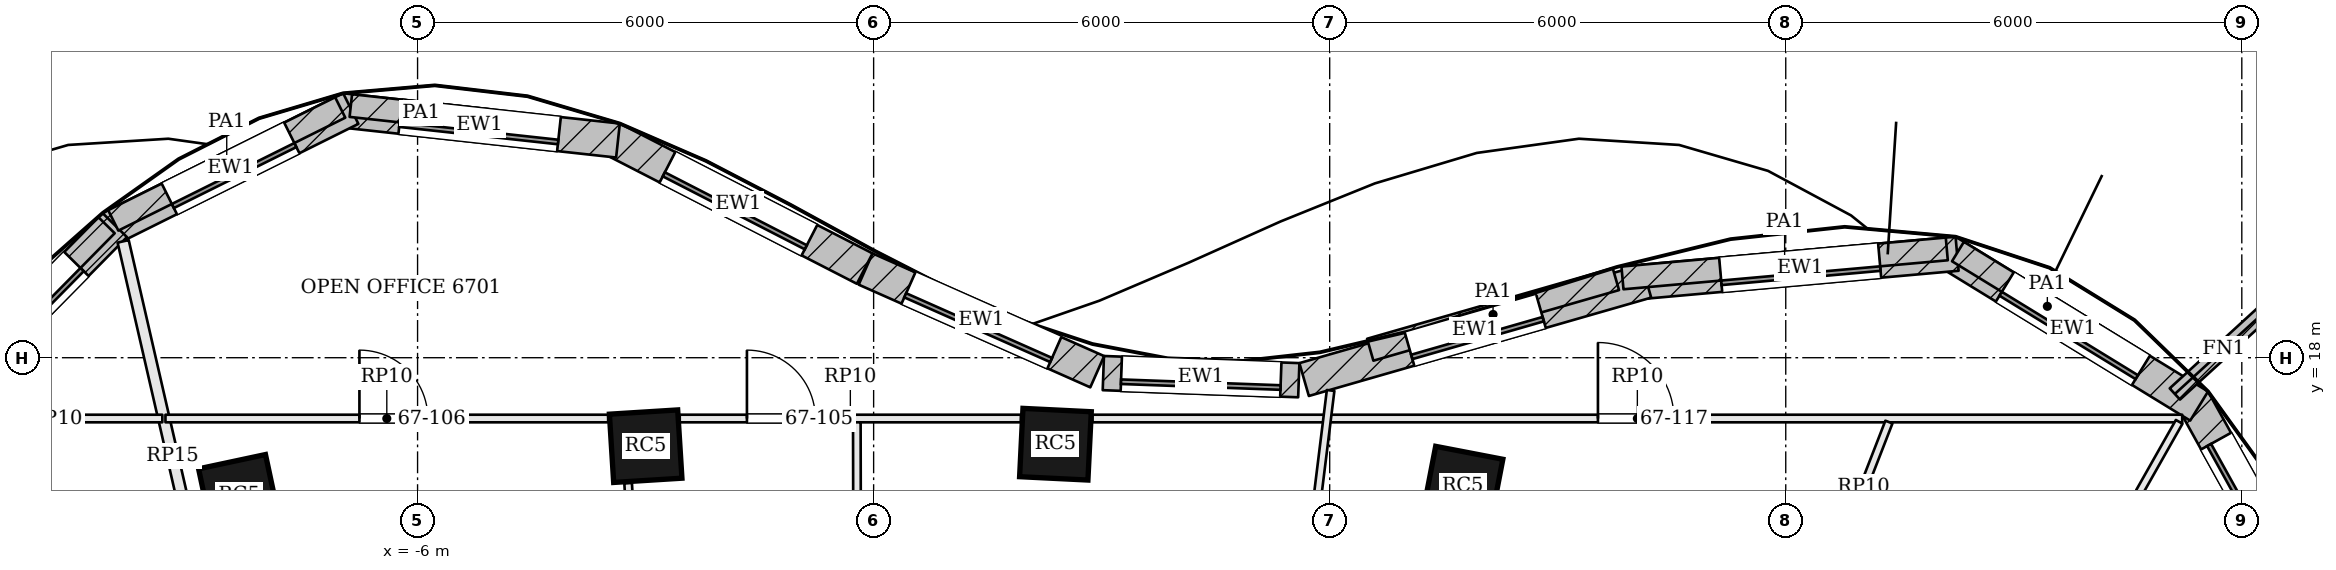
"""IFC4 building model, lengths in metres.
Left out: names, types, materials, properties, quantities, classifications, styles, units other than length and angle.
Written with IfcOpenShell. Run it as: python <this file> out.ifc"""

import sys

from ifc_helpers import new_model, si_unit, direction, frame, frame_2d, origin, origin_2d, place, context, subcontext, project, spatial, rectangle, extrude, element, fill, save


model = new_model("IFC4")
c1 = context("Model", 3, precision=1e-05, world=origin(), true_north=direction((0.0, 1.0)))
c2 = subcontext(c1, "Body", "Model", "MODEL_VIEW")
j1 = project(units=[si_unit("LENGTHUNIT", "METRE"), si_unit("PLANEANGLEUNIT", "RADIAN")], contexts=[c1])
p1 = place(None, origin())
s1 = spatial("IfcSite", under=j1, at=p1, CompositionType="ELEMENT")
p2 = place(p1, origin())
s2 = spatial("IfcBuilding", under=s1, at=p2, CompositionType="ELEMENT")
p3 = place(p2, frame((0.0, 0.0, 272.7)))
s3 = spatial("IfcBuildingStorey", under=s2, at=p3, CompositionType="ELEMENT", Elevation=272.7)
for number, where, z_axis, x_axis in (
    (1, (7.751, 16.307, 0.0), (0.0, 0.0, 1.0), (-0.982, 0.189, 0.0)),
    (2, (2.392, 16.862, 0.0), (0.0, 0.0, 1.0), (-0.999, 0.049, 0.0)),
    (3, (-2.999, 16.836, 0.0), (0.0, 0.0, 1.0), (-0.998, -0.062, 0.0)),
    (4, (-8.347, 16.192, 0.0), (0.0, 0.0, 1.0), (-0.978, -0.209, 0.0)),
):
    element("IfcColumn", number, at=place(p3, frame(where, z_axis=z_axis, x_axis=x_axis)), inside=s3, PredefinedType="COLUMN", context=c2, shape_type="SweptSolid", body=[
        extrude(rectangle(XDim=0.9, YDim=0.9, at=origin_2d()), origin(), (0.0, 0.0, 1.0), 3.9),
    ])
p4 = place(p3, frame((18.983, 14.523, 0.0), z_axis=(0.0, 0.0, 1.0), x_axis=(-0.485630534022, 0.874164163316, 0.0)))
e5 = element("IfcWall", 5, at=p4, inside=s3, PredefinedType="SOLIDWALL", context=c2, shape_type="SweptSolid", body=[
    extrude(rectangle(XDim=3.344, YDim=0.45, at=frame_2d((1.672, 0.0))), origin(), (0.0, 0.0, 1.0), 3.7),
])
p5 = place(p4, frame((0.622, 0.0, 0.9)))
e6 = element("IfcOpeningElement", 6, at=p5, cuts=e5, PredefinedType="OPENING", context=c2, shape_type="SweptSolid", body=[
    extrude(rectangle(XDim=2.1, YDim=2.3, at=frame_2d((1.05, 1.15))), frame((0.0, 0.235, 0.0), z_axis=(0.0, -1.0, 0.0), x_axis=(1.0, 0.0, 0.0)), (0.0, 0.0, 1.0), 0.47),
])
p6 = place(p3, frame((17.438, 17.364, 0.0), z_axis=(0.0, 0.0, 1.0), x_axis=(-0.852622865325, 0.522526793117, 0.0)))
e7 = element("IfcWall", 7, at=p6, inside=s3, PredefinedType="SOLIDWALL", context=c2, shape_type="SweptSolid", body=[
    extrude(rectangle(XDim=3.896, YDim=0.45, at=frame_2d((1.948, 0.0))), origin(), (0.0, 0.0, 1.0), 3.7),
])
p7 = place(p6, frame((0.898, 0.0, 0.9)))
e8 = element("IfcOpeningElement", 8, at=p7, cuts=e7, PredefinedType="OPENING", context=c2, shape_type="SweptSolid", body=[
    extrude(rectangle(XDim=2.1, YDim=2.3, at=frame_2d((1.05, 1.15))), frame((0.0, 0.235, 0.0), z_axis=(0.0, -1.0, 0.0), x_axis=(1.0, 0.0, 0.0)), (0.0, 0.0, 1.0), 0.47),
])
p8 = place(p3, frame((14.254, 19.368, 0.0), z_axis=(0.0, 0.0, 1.0), x_axis=(-0.996031553729, -0.089000808852, 0.0)))
e9 = element("IfcWall", 9, at=p8, inside=s3, PredefinedType="SOLIDWALL", context=c2, shape_type="SweptSolid", body=[
    extrude(rectangle(XDim=4.145, YDim=0.45, at=frame_2d((2.072, 0.0))), origin(), (0.0, 0.0, 1.0), 3.7),
])
p9 = place(p8, frame((1.022, 0.0, 0.9)))
e10 = element("IfcOpeningElement", 10, at=p9, cuts=e9, PredefinedType="OPENING", context=c2, shape_type="SweptSolid", body=[
    extrude(rectangle(XDim=2.1, YDim=2.3, at=frame_2d((1.05, 1.15))), frame((0.0, 0.235, 0.0), z_axis=(0.0, -1.0, 0.0), x_axis=(1.0, 0.0, 0.0)), (0.0, 0.0, 1.0), 0.47),
])
p10 = place(p3, frame((10.167, 19.007, 0.0), z_axis=(0.0, 0.0, 1.0), x_axis=(-0.961104057783, -0.276186513271, 0.0)))
e11 = element("IfcWall", 11, at=p10, inside=s3, PredefinedType="SOLIDWALL", context=c2, shape_type="SweptSolid", body=[
    extrude(rectangle(XDim=4.686, YDim=0.45, at=frame_2d((2.343, 0.0))), origin(), (0.0, 0.0, 1.0), 3.7),
])
p11 = place(p10, frame((1.443, 0.0, 0.9)))
e12 = element("IfcOpeningElement", 12, at=p11, cuts=e11, PredefinedType="OPENING", context=c2, shape_type="SweptSolid", body=[
    extrude(rectangle(XDim=1.8, YDim=2.3, at=frame_2d((0.9, 1.15))), frame((0.0, 0.235, 0.0), z_axis=(0.0, -1.0, 0.0), x_axis=(1.0, 0.0, 0.0)), (0.0, 0.0, 1.0), 0.47),
])
p12 = place(p3, frame((5.594, 17.704, 0.0), z_axis=(0.0, 0.0, 1.0), x_axis=(-0.999339560591, 0.036337895349, 0.0)))
e13 = element("IfcWall", 13, at=p12, inside=s3, PredefinedType="SOLIDWALL", context=c2, shape_type="SweptSolid", body=[
    extrude(rectangle(XDim=2.573, YDim=0.45, at=frame_2d((1.287, 0.0))), origin(), (0.0, 0.0, 1.0), 3.7),
])
p13 = place(p12, frame((0.237, 0.0, 0.9)))
e14 = element("IfcOpeningElement", 14, at=p13, cuts=e13, PredefinedType="OPENING", context=c2, shape_type="SweptSolid", body=[
    extrude(rectangle(XDim=2.1, YDim=2.3, at=frame_2d((1.05, 1.15))), frame((0.0, 0.235, 0.0), z_axis=(0.0, -1.0, 0.0), x_axis=(1.0, 0.0, 0.0)), (0.0, 0.0, 1.0), 0.47),
])
p14 = place(p3, frame((2.942, 17.816, 0.0), z_axis=(0.0, 0.0, 1.0), x_axis=(-0.91414046241, 0.405397601109, 0.0)))
e15 = element("IfcWall", 15, at=p14, inside=s3, PredefinedType="SOLIDWALL", context=c2, shape_type="SweptSolid", body=[
    extrude(rectangle(XDim=3.333, YDim=0.45, at=frame_2d((1.667, 0.0))), origin(), (0.0, 0.0, 1.0), 3.7),
])
p15 = place(p14, frame((0.617, 0.0, 0.9)))
e16 = element("IfcOpeningElement", 16, at=p15, cuts=e15, PredefinedType="OPENING", context=c2, shape_type="SweptSolid", body=[
    extrude(rectangle(XDim=2.1, YDim=2.3, at=frame_2d((1.05, 1.15))), frame((0.0, 0.235, 0.0), z_axis=(0.0, -1.0, 0.0), x_axis=(1.0, 0.0, 0.0)), (0.0, 0.0, 1.0), 0.47),
])
p16 = place(p3, frame((-0.117, 19.173, 0.0), z_axis=(0.0, 0.0, 1.0), x_axis=(-0.889471529144, 0.456990589446, 0.0)))
e17 = element("IfcWall", 17, at=p16, inside=s3, PredefinedType="SOLIDWALL", context=c2, shape_type="SweptSolid", body=[
    extrude(rectangle(XDim=3.735, YDim=0.45, at=frame_2d((1.868, 0.0))), origin(), (0.0, 0.0, 1.0), 3.7),
])
p17 = place(p16, frame((0.818, 0.0, 0.9)))
e18 = element("IfcOpeningElement", 18, at=p17, cuts=e17, PredefinedType="OPENING", context=c2, shape_type="SweptSolid", body=[
    extrude(rectangle(XDim=2.1, YDim=2.3, at=frame_2d((1.05, 1.15))), frame((0.0, 0.235, 0.0), z_axis=(0.0, -1.0, 0.0), x_axis=(1.0, 0.0, 0.0)), (0.0, 0.0, 1.0), 0.47),
])
p18 = place(p3, frame((-3.364, 20.857, 0.0), z_axis=(0.0, 0.0, 1.0), x_axis=(-0.99407653264, 0.108682322638, 0.0)))
e19 = element("IfcWall", 19, at=p18, inside=s3, PredefinedType="SOLIDWALL", context=c2, shape_type="SweptSolid", body=[
    extrude(rectangle(XDim=3.662, YDim=0.45, at=frame_2d((1.831, 0.0))), origin(), (0.0, 0.0, 1.0), 3.7),
])
p19 = place(p18, frame((0.781, 0.0, 0.9)))
e20 = element("IfcOpeningElement", 20, at=p19, cuts=e19, PredefinedType="OPENING", context=c2, shape_type="SweptSolid", body=[
    extrude(rectangle(XDim=2.1, YDim=2.3, at=frame_2d((1.05, 1.15))), frame((0.0, 0.235, 0.0), z_axis=(0.0, -1.0, 0.0), x_axis=(1.0, 0.0, 0.0)), (0.0, 0.0, 1.0), 0.47),
])
p20 = place(p3, frame((-6.879, 21.278, 0.0), z_axis=(0.0, 0.0, 1.0), x_axis=(-0.895268695224, -0.445526613517, 0.0)))
e21 = element("IfcWall", 21, at=p20, inside=s3, PredefinedType="SOLIDWALL", context=c2, shape_type="SweptSolid", body=[
    extrude(rectangle(XDim=3.533, YDim=0.45, at=frame_2d((1.767, 0.0))), origin(), (0.0, 0.0, 1.0), 3.7),
])
p21 = place(p20, frame((0.866, 0.0, 0.9)))
e22 = element("IfcOpeningElement", 22, at=p21, cuts=e21, PredefinedType="OPENING", context=c2, shape_type="SweptSolid", body=[
    extrude(rectangle(XDim=1.8, YDim=2.3, at=frame_2d((0.9, 1.15))), frame((0.0, 0.235, 0.0), z_axis=(0.0, -1.0, 0.0), x_axis=(1.0, 0.0, 0.0)), (0.0, 0.0, 1.0), 0.47),
])
p22 = place(p3, frame((-9.984, 19.745, 0.0), z_axis=(0.0, 0.0, 1.0), x_axis=(-0.701875966769, -0.712299183821, 0.0)))
e23 = element("IfcWall", 23, at=p22, inside=s3, PredefinedType="SOLIDWALL", context=c2, shape_type="SweptSolid", body=[
    extrude(rectangle(XDim=3.537, YDim=0.45, at=frame_2d((1.769, 0.0))), origin(), (0.0, 0.0, 1.0), 3.7),
])
p23 = place(p22, frame((0.718, 0.0, 0.9)))
e24 = element("IfcOpeningElement", 24, at=p23, cuts=e23, PredefinedType="OPENING", context=c2, shape_type="SweptSolid", body=[
    extrude(rectangle(XDim=2.1, YDim=2.3, at=frame_2d((1.05, 1.15))), frame((0.0, 0.235, 0.0), z_axis=(0.0, -1.0, 0.0), x_axis=(1.0, 0.0, 0.0)), (0.0, 0.0, 1.0), 0.47),
])
p24 = place(p3, frame((17.119, 17.523, 0.0), z_axis=(0.0, 0.0, 1.0), x_axis=(0.737866019047, 0.674947211221, 0.0)))
e25 = element("IfcWall", 25, at=p24, inside=s3, PredefinedType="SOLIDWALL", context=c2, shape_type="SweptSolid", body=[
    extrude(rectangle(XDim=1.75, YDim=0.2, at=frame_2d((0.875, 0.0))), origin(), (0.0, 0.0, 1.0), 3.7),
])
p25 = place(p3, frame((16.617, 17.955, 3.9), z_axis=(0.0, 0.0, 1.0), x_axis=(-0.852620335105, 0.522530921732, 0.0)))
e26 = element("IfcWall", 26, at=p25, inside=s3, PredefinedType="PARAPET", context=c2, shape_type="SweptSolid", body=[
    extrude(rectangle(XDim=2.758, YDim=0.3, at=frame_2d((1.379, 0.0))), origin(), (0.0, 0.0, 1.0), 1.1),
])
p26 = place(p3, frame((14.119, 19.431, 3.9), z_axis=(0.0, 0.0, 1.0), x_axis=(-0.996029858658, -0.089019776805, 0.0)))
e27 = element("IfcWall", 27, at=p26, inside=s3, PredefinedType="PARAPET", context=c2, shape_type="SweptSolid", body=[
    extrude(rectangle(XDim=4.284, YDim=0.3, at=frame_2d((2.142, 0.0))), origin(), (0.0, 0.0, 1.0), 1.1),
])
p27 = place(p3, frame((9.765, 19.034, 3.9), z_axis=(0.0, 0.0, 1.0), x_axis=(-0.961095330658, -0.276216881069, 0.0)))
e28 = element("IfcWall", 28, at=p27, inside=s3, PredefinedType="PARAPET", context=c2, shape_type="SweptSolid", body=[
    extrude(rectangle(XDim=3.362, YDim=0.3, at=frame_2d((1.681, 0.0))), origin(), (0.0, 0.0, 1.0), 1.1),
])
p28 = place(p3, frame((-5.025, 21.115, 3.9), z_axis=(0.0, 0.0, 1.0), x_axis=(-0.99407545077, 0.108692217644, 0.0)))
e29 = element("IfcWall", 29, at=p28, inside=s3, PredefinedType="PARAPET", context=c2, shape_type="SweptSolid", body=[
    extrude(rectangle(XDim=1.864, YDim=0.3, at=frame_2d((0.932, 0.0))), origin(), (0.0, 0.0, 1.0), 1.1),
])
p29 = place(p3, frame((-7.018, 21.292, 3.9), z_axis=(0.0, 0.0, 1.0), x_axis=(-0.895289404401, -0.445484996793, 0.0)))
e30 = element("IfcWall", 30, at=p29, inside=s3, PredefinedType="PARAPET", context=c2, shape_type="SweptSolid", body=[
    extrude(rectangle(XDim=3.335, YDim=0.3, at=frame_2d((1.667, 0.0))), origin(), (0.0, 0.0, 1.0), 1.1),
])
p30 = place(p3, frame((-10.091, 19.743, 3.9), z_axis=(0.0, 0.0, 1.0), x_axis=(-0.701890602001, -0.712284762453, 0.0)))
e31 = element("IfcWall", 31, at=p30, inside=s3, PredefinedType="PARAPET", context=c2, shape_type="SweptSolid", body=[
    extrude(rectangle(XDim=3.429, YDim=0.3, at=frame_2d((1.715, 0.0))), origin(), (0.0, 0.0, 1.0), 1.1),
])
p31 = place(p3, frame((-9.873, 19.531, 0.0), z_axis=(0.0, 0.0, 1.0), x_axis=(0.22405782682, -0.974575851456, 0.0)))
e32 = element("IfcWall", 32, at=p31, inside=s3, PredefinedType="PARTITIONING", context=c2, shape_type="SweptSolid", body=[
    extrude(rectangle(XDim=5.806, YDim=0.15, at=frame_2d((2.903, 0.0))), origin(), (0.0, 0.0, 1.0), 3.198),
])
p32 = place(p3, frame((-9.317, 17.2, 0.0), z_axis=(0.0, 0.0, 1.0), x_axis=(1.0, 0.0, 0.0)))
e33 = element("IfcWall", 33, at=p32, inside=s3, PredefinedType="PARTITIONING", context=c2, shape_type="SweptSolid", body=[
    extrude(rectangle(XDim=5.824, YDim=0.1, at=frame_2d((2.912, 0.0))), origin(), (0.0, 0.0, 1.0), 3.184),
])
p33 = place(p32, frame((2.552, 0.0, 0.0)))
e34 = element("IfcOpeningElement", 34, at=p33, cuts=e33, PredefinedType="OPENING", context=c2, shape_type="SweptSolid", body=[
    extrude(rectangle(XDim=0.9, YDim=2.1, at=frame_2d((0.45, 1.05))), frame((0.0, 0.06, 0.0), z_axis=(0.0, -1.0, 0.0), x_axis=(1.0, 0.0, 0.0)), (0.0, 0.0, 1.0), 0.12),
])
p34 = place(p3, frame((-2.551, 17.2, 0.0), z_axis=(0.0, 0.0, 1.0), x_axis=(1.0, 0.0, 0.0)))
e35 = element("IfcWall", 35, at=p34, inside=s3, PredefinedType="PARTITIONING", context=c2, shape_type="SweptSolid", body=[
    extrude(rectangle(XDim=4.489, YDim=0.1, at=frame_2d((2.244, 0.0))), origin(), (0.0, 0.0, 1.0), 3.184),
])
p35 = place(p34, frame((0.884, 0.0, 0.0)))
e36 = element("IfcOpeningElement", 36, at=p35, cuts=e35, PredefinedType="OPENING", context=c2, shape_type="SweptSolid", body=[
    extrude(rectangle(XDim=0.9, YDim=2.1, at=frame_2d((0.45, 1.05))), frame((0.0, 0.06, 0.0), z_axis=(0.0, -1.0, 0.0), x_axis=(1.0, 0.0, 0.0)), (0.0, 0.0, 1.0), 0.12),
])
p36 = place(p3, frame((2.879, 17.2, 0.0), z_axis=(0.0, 0.0, 1.0), x_axis=(1.0, 0.0, 0.0)))
e37 = element("IfcWall", 37, at=p36, inside=s3, PredefinedType="PARTITIONING", context=c2, shape_type="SweptSolid", body=[
    extrude(rectangle(XDim=14.337, YDim=0.1, at=frame_2d((7.168, 0.0))), origin(), (0.0, 0.0, 1.0), 3.184),
])
p37 = place(p36, frame((6.65, 0.0, 0.0)))
e38 = element("IfcOpeningElement", 38, at=p37, cuts=e37, PredefinedType="OPENING", context=c2, shape_type="SweptSolid", body=[
    extrude(rectangle(XDim=1.0, YDim=2.4, at=frame_2d((0.5, 1.2))), frame((0.0, 0.06, 0.0), z_axis=(0.0, -1.0, 0.0), x_axis=(1.0, 0.0, 0.0)), (0.0, 0.0, 1.0), 0.12),
])
p38 = place(p3, frame((14.837, 13.022, 0.0), z_axis=(0.0, 0.0, 1.0), x_axis=(0.492409466631, 0.870363669492, 0.0)))
e39 = element("IfcWall", 39, at=p38, inside=s3, PredefinedType="PARTITIONING", context=c2, shape_type="SweptSolid", body=[
    extrude(rectangle(XDim=4.75, YDim=0.1, at=frame_2d((2.375, 0.0))), origin(), (0.0, 0.0, 1.0), 3.184),
])
p39 = place(p38, frame((1.85, 0.0, 0.0)))
e40 = element("IfcOpeningElement", 40, at=p39, cuts=e39, PredefinedType="OPENING", context=c2, shape_type="SweptSolid", body=[
    extrude(rectangle(XDim=1.0, YDim=2.4, at=frame_2d((0.5, 1.2))), frame((0.0, 0.06, 0.0), z_axis=(0.0, -1.0, 0.0), x_axis=(1.0, 0.0, 0.0)), (0.0, 0.0, 1.0), 0.12),
])
p40 = place(p3, frame((12.692, 15.441, 0.0), z_axis=(0.0, 0.0, 1.0), x_axis=(0.362298742871, 0.932062026323, 0.0)))
e41 = element("IfcWall", 41, at=p40, inside=s3, PredefinedType="PARTITIONING", context=c2, shape_type="SweptSolid", body=[
    extrude(rectangle(XDim=1.837, YDim=0.1, at=frame_2d((0.918, 0.0))), origin(), (0.0, 0.0, 1.0), 3.184),
])
p41 = place(p3, frame((5.556, 13.875, 0.0), z_axis=(0.0, 0.0, 1.0), x_axis=(0.122573624649, 0.99245942312, 0.0)))
e42 = element("IfcWall", 42, at=p41, inside=s3, PredefinedType="PARTITIONING", context=c2, shape_type="SweptSolid", body=[
    extrude(rectangle(XDim=3.723, YDim=0.1, at=frame_2d((1.861, 0.0))), origin(), (0.0, 0.0, 1.0), 3.184),
])
p42 = place(p3, frame((-0.214, 13.875, 0.0), z_axis=(0.0, 0.0, 1.0), x_axis=(-0.002161915329, 0.999997663058, 0.0)))
e43 = element("IfcWall", 43, at=p42, inside=s3, PredefinedType="PARTITIONING", context=c2, shape_type="SweptSolid", body=[
    extrude(rectangle(XDim=3.275, YDim=0.1, at=frame_2d((1.637, 0.0))), origin(), (0.0, 0.0, 1.0), 3.184),
])
p43 = place(p3, frame((-3.091, 13.875, 0.0), z_axis=(0.0, 0.0, 1.0), x_axis=(-0.056026259288, 0.998429295579, 0.0)))
e44 = element("IfcWall", 44, at=p43, inside=s3, PredefinedType="PARTITIONING", context=c2, shape_type="SweptSolid", body=[
    extrude(rectangle(XDim=2.479, YDim=0.1, at=frame_2d((1.24, 0.0))), origin(), (0.0, 0.0, 1.0), 3.184),
])
p44 = place(p3, frame((-12.148, 17.2, 0.0), z_axis=(0.0, 0.0, 1.0), x_axis=(1.0, 0.0, 0.0)))
e45 = element("IfcWall", 45, at=p44, inside=s3, PredefinedType="PARTITIONING", context=c2, shape_type="SweptSolid", body=[
    extrude(rectangle(XDim=2.79, YDim=0.1, at=frame_2d((1.395, 0.0))), origin(), (0.0, 0.0, 1.0), 3.184),
])
p45 = place(p5, origin())
e46 = element("IfcWindow", 46, at=p45, inside=s3, PartitioningType="SINGLE_PANEL", PredefinedType="WINDOW", context=c2, shape_type="SweptSolid", body=[
    extrude(rectangle(XDim=2.1, YDim=2.3, at=frame_2d((1.05, 1.15))), frame((0.0, 0.135, 0.0), z_axis=(0.0, -1.0, 0.0), x_axis=(1.0, 0.0, 0.0)), (0.0, 0.0, 1.0), 0.06),
])
fill(e6, e46)
p46 = place(p7, origin())
e47 = element("IfcWindow", 47, at=p46, inside=s3, PartitioningType="SINGLE_PANEL", PredefinedType="WINDOW", context=c2, shape_type="SweptSolid", body=[
    extrude(rectangle(XDim=2.1, YDim=2.3, at=frame_2d((1.05, 1.15))), frame((0.0, 0.135, 0.0), z_axis=(0.0, -1.0, 0.0), x_axis=(1.0, 0.0, 0.0)), (0.0, 0.0, 1.0), 0.06),
])
fill(e8, e47)
p47 = place(p9, origin())
e48 = element("IfcWindow", 48, at=p47, inside=s3, PartitioningType="SINGLE_PANEL", PredefinedType="WINDOW", context=c2, shape_type="SweptSolid", body=[
    extrude(rectangle(XDim=2.1, YDim=2.3, at=frame_2d((1.05, 1.15))), frame((0.0, 0.135, 0.0), z_axis=(0.0, -1.0, 0.0), x_axis=(1.0, 0.0, 0.0)), (0.0, 0.0, 1.0), 0.06),
])
fill(e10, e48)
p48 = place(p11, origin())
e49 = element("IfcWindow", 49, at=p48, inside=s3, PartitioningType="SINGLE_PANEL", PredefinedType="WINDOW", context=c2, shape_type="SweptSolid", body=[
    extrude(rectangle(XDim=1.8, YDim=2.3, at=frame_2d((0.9, 1.15))), frame((0.0, 0.135, 0.0), z_axis=(0.0, -1.0, 0.0), x_axis=(1.0, 0.0, 0.0)), (0.0, 0.0, 1.0), 0.06),
])
fill(e12, e49)
p49 = place(p13, origin())
e50 = element("IfcWindow", 50, at=p49, inside=s3, PartitioningType="SINGLE_PANEL", PredefinedType="WINDOW", context=c2, shape_type="SweptSolid", body=[
    extrude(rectangle(XDim=2.1, YDim=2.3, at=frame_2d((1.05, 1.15))), frame((0.0, 0.135, 0.0), z_axis=(0.0, -1.0, 0.0), x_axis=(1.0, 0.0, 0.0)), (0.0, 0.0, 1.0), 0.06),
])
fill(e14, e50)
p50 = place(p15, origin())
e51 = element("IfcWindow", 51, at=p50, inside=s3, PartitioningType="SINGLE_PANEL", PredefinedType="WINDOW", context=c2, shape_type="SweptSolid", body=[
    extrude(rectangle(XDim=2.1, YDim=2.3, at=frame_2d((1.05, 1.15))), frame((0.0, 0.135, 0.0), z_axis=(0.0, -1.0, 0.0), x_axis=(1.0, 0.0, 0.0)), (0.0, 0.0, 1.0), 0.06),
])
fill(e16, e51)
p51 = place(p17, origin())
e52 = element("IfcWindow", 52, at=p51, inside=s3, PartitioningType="SINGLE_PANEL", PredefinedType="WINDOW", context=c2, shape_type="SweptSolid", body=[
    extrude(rectangle(XDim=2.1, YDim=2.3, at=frame_2d((1.05, 1.15))), frame((0.0, 0.135, 0.0), z_axis=(0.0, -1.0, 0.0), x_axis=(1.0, 0.0, 0.0)), (0.0, 0.0, 1.0), 0.06),
])
fill(e18, e52)
p52 = place(p19, origin())
e53 = element("IfcWindow", 53, at=p52, inside=s3, PartitioningType="SINGLE_PANEL", PredefinedType="WINDOW", context=c2, shape_type="SweptSolid", body=[
    extrude(rectangle(XDim=2.1, YDim=2.3, at=frame_2d((1.05, 1.15))), frame((0.0, 0.135, 0.0), z_axis=(0.0, -1.0, 0.0), x_axis=(1.0, 0.0, 0.0)), (0.0, 0.0, 1.0), 0.06),
])
fill(e20, e53)
p53 = place(p21, origin())
e54 = element("IfcWindow", 54, at=p53, inside=s3, PartitioningType="SINGLE_PANEL", PredefinedType="WINDOW", context=c2, shape_type="SweptSolid", body=[
    extrude(rectangle(XDim=1.8, YDim=2.3, at=frame_2d((0.9, 1.15))), frame((0.0, 0.135, 0.0), z_axis=(0.0, -1.0, 0.0), x_axis=(1.0, 0.0, 0.0)), (0.0, 0.0, 1.0), 0.06),
])
fill(e22, e54)
p54 = place(p23, origin())
e55 = element("IfcWindow", 55, at=p54, inside=s3, PartitioningType="SINGLE_PANEL", PredefinedType="WINDOW", context=c2, shape_type="SweptSolid", body=[
    extrude(rectangle(XDim=2.1, YDim=2.3, at=frame_2d((1.05, 1.15))), frame((0.0, 0.135, 0.0), z_axis=(0.0, -1.0, 0.0), x_axis=(1.0, 0.0, 0.0)), (0.0, 0.0, 1.0), 0.06),
])
fill(e24, e55)
p55 = place(p35, origin())
e56 = element("IfcDoor", 56, at=p55, inside=s3, OperationType="SINGLE_SWING_LEFT", PredefinedType="DOOR", context=c2, shape_type="SweptSolid", body=[
    extrude(rectangle(XDim=0.9, YDim=2.1, at=frame_2d((0.45, 1.05))), frame((0.0, 0.025, 0.0), z_axis=(0.0, -1.0, 0.0), x_axis=(1.0, 0.0, 0.0)), (0.0, 0.0, 1.0), 0.05),
])
fill(e36, e56)
p56 = place(p33, origin())
e57 = element("IfcDoor", 57, at=p56, inside=s3, OperationType="SINGLE_SWING_LEFT", PredefinedType="DOOR", context=c2, shape_type="SweptSolid", body=[
    extrude(rectangle(XDim=0.9, YDim=2.1, at=frame_2d((0.45, 1.05))), frame((0.0, 0.025, 0.0), z_axis=(0.0, -1.0, 0.0), x_axis=(1.0, 0.0, 0.0)), (0.0, 0.0, 1.0), 0.05),
])
fill(e34, e57)
p57 = place(p37, origin())
e58 = element("IfcDoor", 58, at=p57, inside=s3, OperationType="SINGLE_SWING_LEFT", PredefinedType="DOOR", context=c2, shape_type="SweptSolid", body=[
    extrude(rectangle(XDim=1.0, YDim=2.4, at=frame_2d((0.5, 1.2))), frame((0.0, 0.025, 0.0), z_axis=(0.0, -1.0, 0.0), x_axis=(1.0, 0.0, 0.0)), (0.0, 0.0, 1.0), 0.05),
])
fill(e38, e58)
save(model, sys.argv[1])
